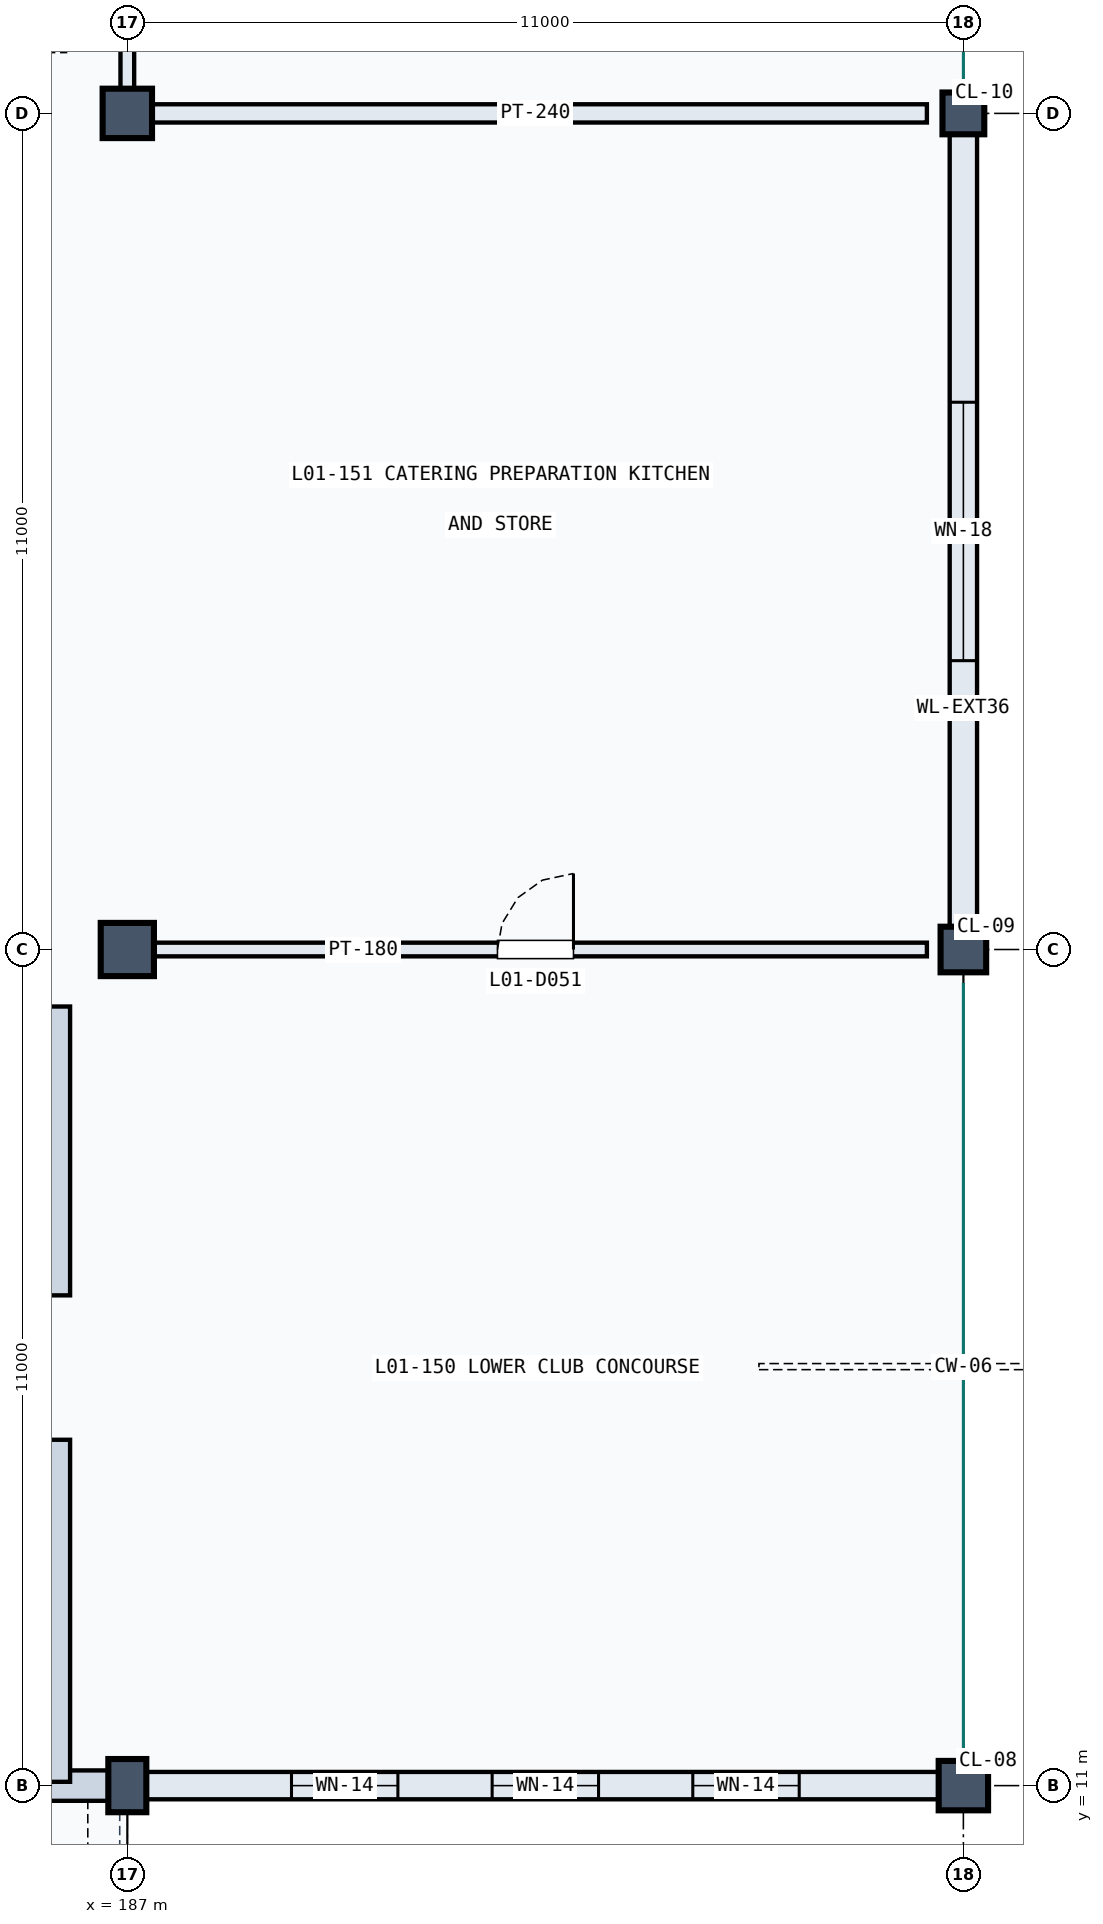
"""IFC4 building model, lengths in metres.
Left out: names, types, materials, properties, quantities, classifications, styles, units other than length and angle.
Written with IfcOpenShell. Run it as: python <this file> out.ifc"""

import sys

from ifc_helpers import new_model, si_unit, direction, frame, frame_2d, origin, origin_2d, place, context, subcontext, project, spatial, rectangle, extrude, element, fill, save


model = new_model("IFC4")
c1 = context("Model", 3, precision=1e-05, world=origin(), true_north=direction((0.0, 1.0)))
c2 = subcontext(c1, "Body", "Model", "MODEL_VIEW")
j1 = project(units=[si_unit("LENGTHUNIT", "METRE"), si_unit("PLANEANGLEUNIT", "RADIAN")], contexts=[c1])
p1 = place(None, origin())
s1 = spatial("IfcSite", under=j1, at=p1, CompositionType="ELEMENT")
p2 = place(p1, origin())
s2 = spatial("IfcBuilding", under=s1, at=p2, CompositionType="ELEMENT")
p3 = place(p2, frame((0.0, 0.0, 5.4)))
s3 = spatial("IfcBuildingStorey", under=s2, at=p3, CompositionType="ELEMENT", Elevation=5.4)
p4 = place(p3, frame((187.0, 11.0, 0.0), z_axis=(0.0, 0.0, 1.0), x_axis=(1.0, 0.0, 0.0)))
e1 = element("IfcColumn", 1, at=p4, inside=s3, PredefinedType="COLUMN", context=c2, shape_type="SweptSolid", body=[
    extrude(rectangle(XDim=0.5, YDim=0.7, at=origin_2d()), origin(), (0.0, 0.0, 1.0), 4.8),
])
p5 = place(p3, frame((187.0, 22.0, 0.0), z_axis=(0.0, 0.0, 1.0), x_axis=(1.0, 0.0, 0.0)))
e2 = element("IfcColumn", 2, at=p5, inside=s3, PredefinedType="COLUMN", context=c2, shape_type="SweptSolid", body=[
    extrude(rectangle(XDim=0.7, YDim=0.7, at=origin_2d()), origin(), (0.0, 0.0, 1.0), 4.8),
])
for number, where, z_axis, x_axis in (
    (3, (187.0, 33.0, 0.0), (0.0, 0.0, 1.0), (1.0, 0.0, 0.0)),
    (4, (198.0, 11.0, 0.0), (0.0, 0.0, 1.0), (1.0, 0.0, 0.0)),
):
    element("IfcColumn", number, at=place(p3, frame(where, z_axis=z_axis, x_axis=x_axis)), inside=s3, PredefinedType="COLUMN", context=c2, shape_type="SweptSolid", body=[
        extrude(rectangle(XDim=0.65, YDim=0.65, at=origin_2d()), origin(), (0.0, 0.0, 1.0), 4.8),
    ])
p6 = place(p3, frame((198.0, 22.0, 0.0), z_axis=(0.0, 0.0, 1.0), x_axis=(1.0, 0.0, 0.0)))
e5 = element("IfcColumn", 5, at=p6, inside=s3, PredefinedType="COLUMN", context=c2, shape_type="SweptSolid", body=[
    extrude(rectangle(XDim=0.6, YDim=0.6, at=origin_2d()), origin(), (0.0, 0.0, 1.0), 4.8),
])
p7 = place(p3, frame((198.0, 33.0, 0.0), z_axis=(0.0, 0.0, 1.0), x_axis=(1.0, 0.0, 0.0)))
e6 = element("IfcColumn", 6, at=p7, inside=s3, PredefinedType="COLUMN", context=c2, shape_type="SweptSolid", body=[
    extrude(rectangle(XDim=0.55, YDim=0.55, at=origin_2d()), origin(), (0.0, 0.0, 1.0), 4.8),
])
p8 = place(p3, frame((176.22, 11.0, 0.0), z_axis=(0.0, 0.0, 1.0), x_axis=(1.0, 0.0, 0.0)))
e7 = element("IfcWall", 7, at=p8, inside=s3, PredefinedType="SOLIDWALL", context=c2, shape_type="SweptSolid", body=[
    extrude(rectangle(XDim=10.56, YDim=0.4, at=frame_2d((5.28, 0.0))), origin(), (0.0, 0.0, 1.0), 3.49),
])
p9 = place(p8, frame((2.845, 0.0, 0.8)))
e8 = element("IfcOpeningElement", 8, at=p9, cuts=e7, PredefinedType="OPENING", context=c2, shape_type="SweptSolid", body=[
    extrude(rectangle(XDim=1.35, YDim=2.1, at=frame_2d((0.675, 1.05))), frame((0.0, 0.21, 0.0), z_axis=(0.0, -1.0, 0.0), x_axis=(1.0, 0.0, 0.0)), (0.0, 0.0, 1.0), 0.42),
])
p10 = place(p8, frame((6.365, 0.0, 0.8)))
e9 = element("IfcOpeningElement", 9, at=p10, cuts=e7, PredefinedType="OPENING", context=c2, shape_type="SweptSolid", body=[
    extrude(rectangle(XDim=1.35, YDim=2.1, at=frame_2d((0.675, 1.05))), frame((0.0, 0.21, 0.0), z_axis=(0.0, -1.0, 0.0), x_axis=(1.0, 0.0, 0.0)), (0.0, 0.0, 1.0), 0.42),
])
p11 = place(p3, frame((187.22, 11.0, 0.0), z_axis=(0.0, 0.0, 1.0), x_axis=(1.0, 0.0, 0.0)))
e10 = element("IfcWall", 10, at=p11, inside=s3, PredefinedType="SOLIDWALL", context=c2, shape_type="SweptSolid", body=[
    extrude(rectangle(XDim=10.56, YDim=0.36, at=frame_2d((5.28, 0.0))), origin(), (0.0, 0.0, 1.0), 3.705),
])
p12 = place(p11, frame((1.94, 0.0, 0.95)))
e11 = element("IfcOpeningElement", 11, at=p12, cuts=e10, PredefinedType="OPENING", context=c2, shape_type="SweptSolid", body=[
    extrude(rectangle(XDim=1.4, YDim=1.5, at=frame_2d((0.7, 0.75))), frame((0.0, 0.19, 0.0), z_axis=(0.0, -1.0, 0.0), x_axis=(1.0, 0.0, 0.0)), (0.0, 0.0, 1.0), 0.38),
])
p13 = place(p11, frame((4.58, 0.0, 0.95)))
e12 = element("IfcOpeningElement", 12, at=p13, cuts=e10, PredefinedType="OPENING", context=c2, shape_type="SweptSolid", body=[
    extrude(rectangle(XDim=1.4, YDim=1.5, at=frame_2d((0.7, 0.75))), frame((0.0, 0.19, 0.0), z_axis=(0.0, -1.0, 0.0), x_axis=(1.0, 0.0, 0.0)), (0.0, 0.0, 1.0), 0.38),
])
p14 = place(p11, frame((7.22, 0.0, 0.95)))
e13 = element("IfcOpeningElement", 13, at=p14, cuts=e10, PredefinedType="OPENING", context=c2, shape_type="SweptSolid", body=[
    extrude(rectangle(XDim=1.4, YDim=1.5, at=frame_2d((0.7, 0.75))), frame((0.0, 0.19, 0.0), z_axis=(0.0, -1.0, 0.0), x_axis=(1.0, 0.0, 0.0)), (0.0, 0.0, 1.0), 0.38),
])
p15 = place(p3, frame((198.0, 22.22, 0.0), z_axis=(0.0, 0.0, 1.0), x_axis=(0.0, 1.0, 0.0)))
e14 = element("IfcWall", 14, at=p15, inside=s3, PredefinedType="SOLIDWALL", context=c2, shape_type="SweptSolid", body=[
    extrude(rectangle(XDim=10.56, YDim=0.36, at=frame_2d((5.28, 0.0))), origin(), (0.0, 0.0, 1.0), 3.705),
])
p16 = place(p15, frame((3.58, 0.0, 0.9)))
e15 = element("IfcOpeningElement", 15, at=p16, cuts=e14, PredefinedType="OPENING", context=c2, shape_type="SweptSolid", body=[
    extrude(rectangle(XDim=3.4, YDim=1.75, at=frame_2d((1.7, 0.875))), frame((0.0, 0.19, 0.0), z_axis=(0.0, -1.0, 0.0), x_axis=(1.0, 0.0, 0.0)), (0.0, 0.0, 1.0), 0.38),
])
p17 = place(p3, frame((186.072, 11.05, 0.0), z_axis=(0.0, 0.0, 1.0), x_axis=(0.0, 1.0, 0.0)))
e16 = element("IfcWall", 16, at=p17, inside=s3, PredefinedType="SOLIDWALL", context=c2, shape_type="SweptSolid", body=[
    extrude(rectangle(XDim=4.5, YDim=0.35, at=frame_2d((2.25, 0.0))), origin(), (0.0, 0.0, 1.0), 4.46),
])
p18 = place(p3, frame((186.072, 17.45, 0.0), z_axis=(0.0, 0.0, 1.0), x_axis=(0.0, 1.0, 0.0)))
e17 = element("IfcWall", 17, at=p18, inside=s3, PredefinedType="SOLIDWALL", context=c2, shape_type="SweptSolid", body=[
    extrude(rectangle(XDim=3.8, YDim=0.35, at=frame_2d((1.9, 0.0))), origin(), (0.0, 0.0, 1.0), 4.46),
])
p19 = place(p3, frame((187.22, 22.0, 0.0), z_axis=(0.0, 0.0, 1.0), x_axis=(1.0, 0.0, 0.0)))
e18 = element("IfcWall", 18, at=p19, inside=s3, PredefinedType="PARTITIONING", context=c2, shape_type="SweptSolid", body=[
    extrude(rectangle(XDim=10.3, YDim=0.18, at=frame_2d((5.15, 0.0))), origin(), (0.0, 0.0, 1.0), 3.705),
])
p20 = place(p19, frame((4.65, 0.0, 0.0)))
e19 = element("IfcOpeningElement", 19, at=p20, cuts=e18, PredefinedType="OPENING", context=c2, shape_type="SweptSolid", body=[
    extrude(rectangle(XDim=1.0, YDim=2.15, at=frame_2d((0.5, 1.075))), frame((0.0, 0.1, 0.0), z_axis=(0.0, -1.0, 0.0), x_axis=(1.0, 0.0, 0.0)), (0.0, 0.0, 1.0), 0.2),
])
p21 = place(p3, frame((187.0, 33.22, 0.0), z_axis=(0.0, 0.0, 1.0), x_axis=(0.0, 1.0, 0.0)))
e20 = element("IfcWall", 20, at=p21, inside=s3, PredefinedType="PARTITIONING", context=c2, shape_type="SweptSolid", body=[
    extrude(rectangle(XDim=10.56, YDim=0.18, at=frame_2d((5.28, 0.0))), origin(), (0.0, 0.0, 1.0), 3.44),
])
p22 = place(p3, frame((187.22, 33.0, 0.0), z_axis=(0.0, 0.0, 1.0), x_axis=(1.0, 0.0, 0.0)))
e21 = element("IfcWall", 21, at=p22, inside=s3, PredefinedType="PARTITIONING", context=c2, shape_type="SweptSolid", body=[
    extrude(rectangle(XDim=10.3, YDim=0.24, at=frame_2d((5.15, 0.0))), origin(), (0.0, 0.0, 1.0), 3.705),
])
p23 = place(p12, origin())
e22 = element("IfcWindow", 22, at=p23, inside=s3, PartitioningType="SINGLE_PANEL", PredefinedType="WINDOW", context=c2, shape_type="SweptSolid", body=[
    extrude(rectangle(XDim=1.4, YDim=1.5, at=frame_2d((0.7, 0.75))), frame((0.0, 0.03, 0.0), z_axis=(0.0, -1.0, 0.0), x_axis=(1.0, 0.0, 0.0)), (0.0, 0.0, 1.0), 0.06),
])
fill(e11, e22)
p24 = place(p13, origin())
e23 = element("IfcWindow", 23, at=p24, inside=s3, PartitioningType="SINGLE_PANEL", PredefinedType="WINDOW", context=c2, shape_type="SweptSolid", body=[
    extrude(rectangle(XDim=1.4, YDim=1.5, at=frame_2d((0.7, 0.75))), frame((0.0, 0.03, 0.0), z_axis=(0.0, -1.0, 0.0), x_axis=(1.0, 0.0, 0.0)), (0.0, 0.0, 1.0), 0.06),
])
fill(e12, e23)
p25 = place(p14, origin())
e24 = element("IfcWindow", 24, at=p25, inside=s3, PartitioningType="SINGLE_PANEL", PredefinedType="WINDOW", context=c2, shape_type="SweptSolid", body=[
    extrude(rectangle(XDim=1.4, YDim=1.5, at=frame_2d((0.7, 0.75))), frame((0.0, 0.03, 0.0), z_axis=(0.0, -1.0, 0.0), x_axis=(1.0, 0.0, 0.0)), (0.0, 0.0, 1.0), 0.06),
])
fill(e13, e24)
p26 = place(p16, origin())
e25 = element("IfcWindow", 25, at=p26, inside=s3, PartitioningType="SINGLE_PANEL", PredefinedType="WINDOW", context=c2, shape_type="SweptSolid", body=[
    extrude(rectangle(XDim=3.4, YDim=1.75, at=frame_2d((1.7, 0.875))), frame((0.0, 0.03, 0.0), z_axis=(0.0, -1.0, 0.0), x_axis=(1.0, 0.0, 0.0)), (0.0, 0.0, 1.0), 0.06),
])
fill(e15, e25)
p27 = place(p20, origin())
e26 = element("IfcDoor", 26, at=p27, inside=s3, OperationType="SINGLE_SWING_RIGHT", PredefinedType="DOOR", context=c2, shape_type="SweptSolid", body=[
    extrude(rectangle(XDim=1.0, YDim=2.15, at=frame_2d((0.5, 1.075))), frame((0.0, 0.025, 0.0), z_axis=(0.0, -1.0, 0.0), x_axis=(1.0, 0.0, 0.0)), (0.0, 0.0, 1.0), 0.05),
])
fill(e19, e26)
save(model, sys.argv[1])
